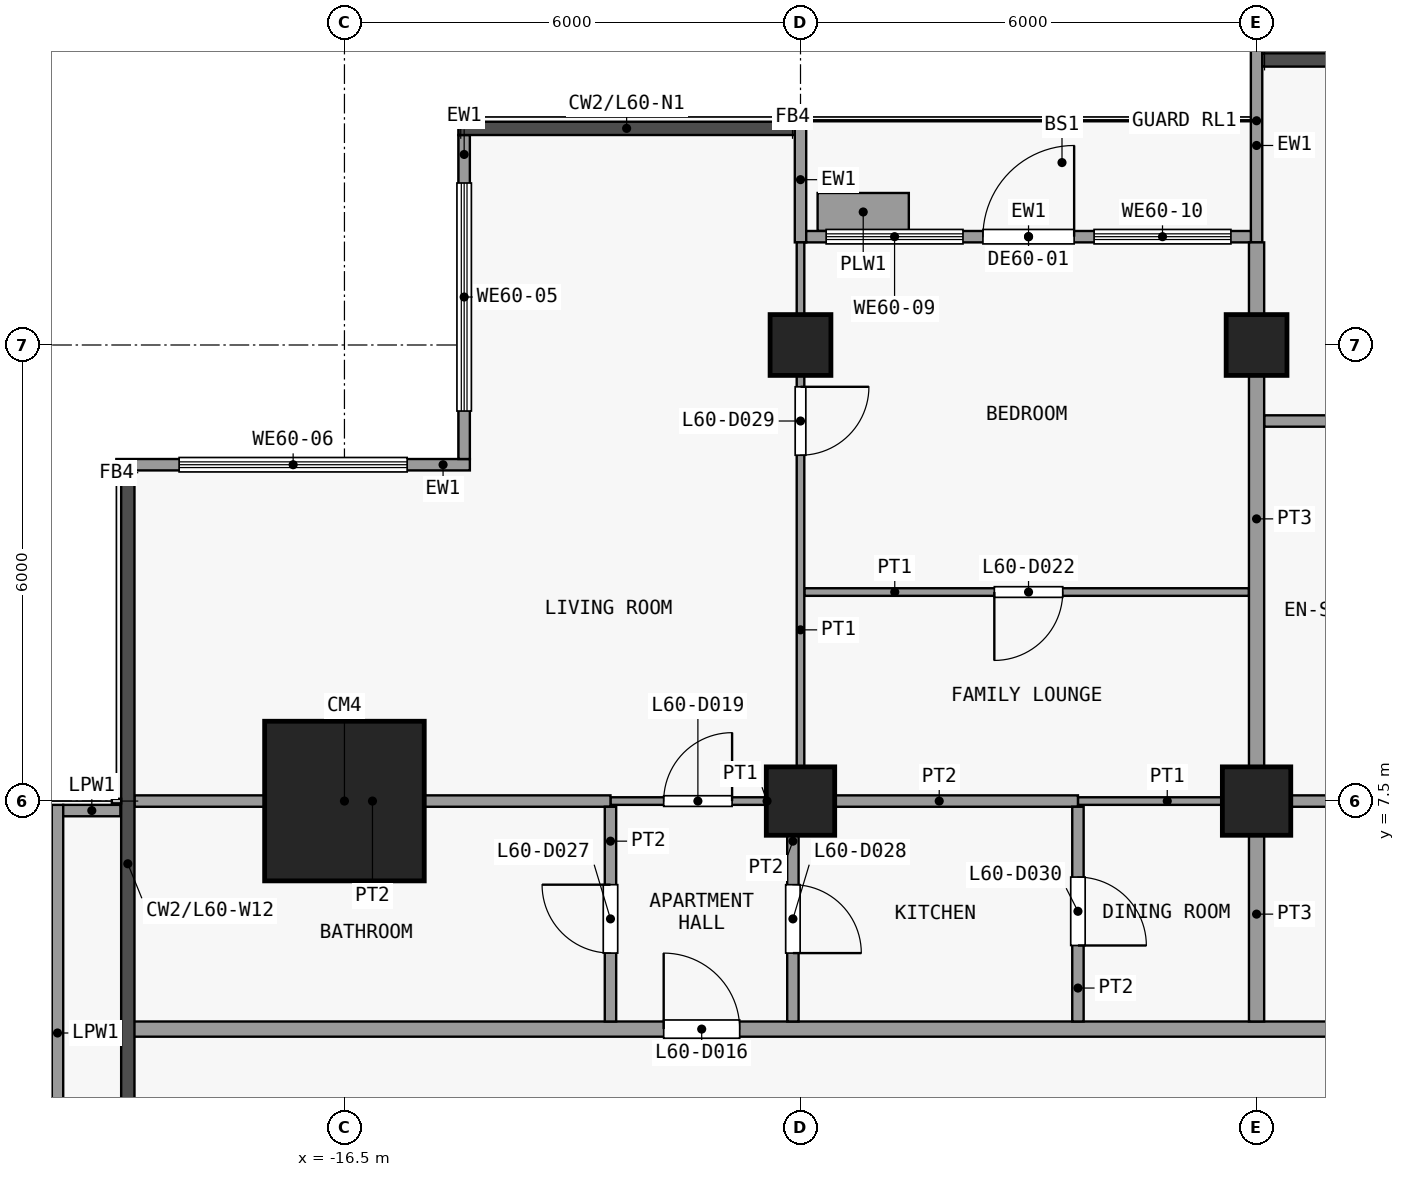
"""IFC4 building model, lengths in metres.
Left out: names, types, materials, properties, quantities, classifications, styles, units other than length and angle.
Written with IfcOpenShell. Run it as: python <this file> out.ifc"""

import sys

from ifc_helpers import new_model, si_unit, direction, frame, frame_2d, origin, origin_2d, place, context, subcontext, project, spatial, rectangle, extrude, element, fill, save


model = new_model("IFC4")
c1 = context("Model", 3, precision=1e-05, world=origin(), true_north=direction((0.0, 1.0)))
c2 = subcontext(c1, "Body", "Model", "MODEL_VIEW")
j1 = project(units=[si_unit("LENGTHUNIT", "METRE"), si_unit("PLANEANGLEUNIT", "RADIAN")], contexts=[c1])
p1 = place(None, origin())
s1 = spatial("IfcSite", under=j1, at=p1, CompositionType="ELEMENT")
p2 = place(p1, origin())
s2 = spatial("IfcBuilding", under=s1, at=p2, CompositionType="ELEMENT")
p3 = place(p2, frame((0.0, 0.0, 237.5)))
s3 = spatial("IfcBuildingStorey", under=s2, at=p3, CompositionType="ELEMENT", Elevation=237.5)
p4 = place(p3, frame((-16.5, 7.5, 0.0), z_axis=(0.0, 0.0, 1.0), x_axis=(1.0, 0.0, 0.0)))
e1 = element("IfcColumn", 1, at=p4, inside=s3, PredefinedType="COLUMN", context=c2, shape_type="SweptSolid", body=[
    extrude(rectangle(XDim=2.1, YDim=2.1, at=origin_2d()), origin(), (0.0, 0.0, 1.0), 3.6),
])
p5 = place(p3, frame((-10.5, 7.5, 0.0), z_axis=(0.0, 0.0, 1.0), x_axis=(1.0, 0.0, 0.0)))
e2 = element("IfcColumn", 2, at=p5, inside=s3, PredefinedType="COLUMN", context=c2, shape_type="SweptSolid", body=[
    extrude(rectangle(XDim=0.9, YDim=0.9, at=origin_2d()), origin(), (0.0, 0.0, 1.0), 3.6),
])
p6 = place(p3, frame((-10.5, 13.5, 0.0), z_axis=(0.0, 0.0, 1.0), x_axis=(1.0, 0.0, 0.0)))
e3 = element("IfcColumn", 3, at=p6, inside=s3, PredefinedType="COLUMN", context=c2, shape_type="SweptSolid", body=[
    extrude(rectangle(XDim=0.8, YDim=0.8, at=origin_2d()), origin(), (0.0, 0.0, 1.0), 3.6),
])
p7 = place(p3, frame((-4.5, 7.5, 0.0), z_axis=(0.0, 0.0, 1.0), x_axis=(1.0, 0.0, 0.0)))
e4 = element("IfcColumn", 4, at=p7, inside=s3, PredefinedType="COLUMN", context=c2, shape_type="SweptSolid", body=[
    extrude(rectangle(XDim=0.9, YDim=0.9, at=origin_2d()), origin(), (0.0, 0.0, 1.0), 3.6),
])
p8 = place(p3, frame((-4.5, 13.5, 0.0), z_axis=(0.0, 0.0, 1.0), x_axis=(1.0, 0.0, 0.0)))
e5 = element("IfcColumn", 5, at=p8, inside=s3, PredefinedType="COLUMN", context=c2, shape_type="SweptSolid", body=[
    extrude(rectangle(XDim=0.8, YDim=0.8, at=origin_2d()), origin(), (0.0, 0.0, 1.0), 3.6),
])
p9 = place(p3, frame((-14.925, 12.0, 0.0), z_axis=(0.0, 0.0, 1.0), x_axis=(0.0, 1.0, 0.0)))
e6 = element("IfcWall", 6, at=p9, inside=s3, PredefinedType="SOLIDWALL", context=c2, shape_type="SweptSolid", body=[
    extrude(rectangle(XDim=4.262, YDim=0.15, at=frame_2d((2.131, 0.0))), origin(), (0.0, 0.0, 1.0), 3.3),
])
p10 = place(p9, frame((0.631, 0.0, 0.9)))
e7 = element("IfcOpeningElement", 7, at=p10, cuts=e6, PredefinedType="OPENING", context=c2, shape_type="SweptSolid", body=[
    extrude(rectangle(XDim=3.0, YDim=2.4, at=frame_2d((1.5, 1.2))), frame((0.0, 0.085, 0.0), z_axis=(0.0, -1.0, 0.0), x_axis=(1.0, 0.0, 0.0)), (0.0, 0.0, 1.0), 0.17),
])
p11 = place(p3, frame((-19.5, 11.925, 0.0), z_axis=(0.0, 0.0, 1.0), x_axis=(1.0, 0.0, 0.0)))
e8 = element("IfcWall", 8, at=p11, inside=s3, PredefinedType="SOLIDWALL", context=c2, shape_type="SweptSolid", body=[
    extrude(rectangle(XDim=4.65, YDim=0.15, at=frame_2d((2.325, 0.0))), origin(), (0.0, 0.0, 1.0), 3.3),
])
p12 = place(p11, frame((0.825, 0.0, 0.9)))
e9 = element("IfcOpeningElement", 9, at=p12, cuts=e8, PredefinedType="OPENING", context=c2, shape_type="SweptSolid", body=[
    extrude(rectangle(XDim=3.0, YDim=2.4, at=frame_2d((1.5, 1.2))), frame((0.0, 0.085, 0.0), z_axis=(0.0, -1.0, 0.0), x_axis=(1.0, 0.0, 0.0)), (0.0, 0.0, 1.0), 0.17),
])
p13 = place(p3, frame((-10.5, 14.85, 0.0), z_axis=(0.0, 0.0, 1.0), x_axis=(0.0, 1.0, 0.0)))
e10 = element("IfcWall", 10, at=p13, inside=s3, PredefinedType="SOLIDWALL", context=c2, shape_type="SweptSolid", body=[
    extrude(rectangle(XDim=1.65, YDim=0.15, at=frame_2d((0.825, 0.0))), origin(), (0.0, 0.0, 1.0), 3.3),
])
p14 = place(p3, frame((-4.5, 14.85, 0.0), z_axis=(0.0, 0.0, 1.0), x_axis=(0.0, 1.0, 0.0)))
e11 = element("IfcWall", 11, at=p14, inside=s3, PredefinedType="SOLIDWALL", context=c2, shape_type="SweptSolid", body=[
    extrude(rectangle(XDim=2.55, YDim=0.15, at=frame_2d((1.275, 0.0))), origin(), (0.0, 0.0, 1.0), 3.3),
])
p15 = place(p3, frame((-10.425, 14.925, 0.0), z_axis=(0.0, 0.0, 1.0), x_axis=(1.0, 0.0, 0.0)))
e12 = element("IfcWall", 12, at=p15, inside=s3, PredefinedType="SOLIDWALL", context=c2, shape_type="SweptSolid", body=[
    extrude(rectangle(XDim=5.85, YDim=0.15, at=frame_2d((2.925, 0.0))), origin(), (0.0, 0.0, 1.0), 3.3),
])
p16 = place(p15, frame((2.325, 0.0, 0.0)))
e13 = element("IfcOpeningElement", 13, at=p16, cuts=e12, PredefinedType="OPENING", context=c2, shape_type="SweptSolid", body=[
    extrude(rectangle(XDim=1.2, YDim=2.4, at=frame_2d((0.6, 1.2))), frame((0.0, 0.085, 0.0), z_axis=(0.0, -1.0, 0.0), x_axis=(1.0, 0.0, 0.0)), (0.0, 0.0, 1.0), 0.17),
])
p17 = place(p15, frame((0.262, 0.0, 0.9)))
e14 = element("IfcOpeningElement", 14, at=p17, cuts=e12, PredefinedType="OPENING", context=c2, shape_type="SweptSolid", body=[
    extrude(rectangle(XDim=1.8, YDim=2.1, at=frame_2d((0.9, 1.05))), frame((0.0, 0.085, 0.0), z_axis=(0.0, -1.0, 0.0), x_axis=(1.0, 0.0, 0.0)), (0.0, 0.0, 1.0), 0.17),
])
p18 = place(p15, frame((3.788, 0.0, 0.9)))
e15 = element("IfcOpeningElement", 15, at=p18, cuts=e12, PredefinedType="OPENING", context=c2, shape_type="SweptSolid", body=[
    extrude(rectangle(XDim=1.8, YDim=2.1, at=frame_2d((0.9, 1.05))), frame((0.0, 0.085, 0.0), z_axis=(0.0, -1.0, 0.0), x_axis=(1.0, 0.0, 0.0)), (0.0, 0.0, 1.0), 0.17),
])
p19 = place(p3, frame((-10.275, 15.25, 0.0), z_axis=(0.0, 0.0, 1.0), x_axis=(1.0, 0.0, 0.0)))
e16 = element("IfcWall", 16, at=p19, inside=s3, PredefinedType="USERDEFINED", context=c2, shape_type="SweptSolid", body=[
    extrude(rectangle(XDim=1.2, YDim=0.5, at=frame_2d((0.6, 0.0))), origin(), (0.0, 0.0, 1.0), 0.9),
])
p20 = place(p3, frame((-20.275, 1.448, 0.0), z_axis=(0.0, 0.0, 1.0), x_axis=(0.0, 1.0, 0.0)))
e17 = element("IfcWall", 17, at=p20, inside=s3, PredefinedType="PARAPET", context=c2, shape_type="SweptSolid", body=[
    extrude(rectangle(XDim=6.002, YDim=0.15, at=frame_2d((3.001, 0.0))), origin(), (0.0, 0.0, 1.0), 1.15),
])
p21 = place(p3, frame((-20.2, 7.375, 0.0), z_axis=(0.0, 0.0, 1.0), x_axis=(1.0, 0.0, 0.0)))
e18 = element("IfcWall", 18, at=p21, inside=s3, PredefinedType="PARAPET", context=c2, shape_type="SweptSolid", body=[
    extrude(rectangle(XDim=0.752, YDim=0.15, at=frame_2d((0.376, 0.0))), origin(), (0.0, 0.0, 1.0), 1.15),
])
p22 = place(p3, frame((-19.35, 4.5, 0.0), z_axis=(0.0, 0.0, 1.0), x_axis=(1.0, 0.0, 0.0)))
e19 = element("IfcWall", 19, at=p22, inside=s3, PredefinedType="PARTITIONING", context=c2, shape_type="SweptSolid", body=[
    extrude(rectangle(XDim=37.2, YDim=0.2, at=frame_2d((18.6, 0.0))), origin(), (0.0, 0.0, 1.0), 3.3),
])
p23 = place(p22, frame((7.05, 0.0, 0.0)))
e20 = element("IfcOpeningElement", 20, at=p23, cuts=e19, PredefinedType="OPENING", context=c2, shape_type="SweptSolid", body=[
    extrude(rectangle(XDim=1.0, YDim=2.1, at=frame_2d((0.5, 1.05))), frame((0.0, 0.11, 0.0), z_axis=(0.0, -1.0, 0.0), x_axis=(1.0, 0.0, 0.0)), (0.0, 0.0, 1.0), 0.22),
])
p24 = place(p22, frame((24.55, 0.0, 0.0)))
e21 = element("IfcOpeningElement", 21, at=p24, cuts=e19, PredefinedType="OPENING", context=c2, shape_type="SweptSolid", body=[
    extrude(rectangle(XDim=1.0, YDim=2.1, at=frame_2d((0.5, 1.05))), frame((0.0, 0.11, 0.0), z_axis=(0.0, -1.0, 0.0), x_axis=(1.0, 0.0, 0.0)), (0.0, 0.0, 1.0), 0.22),
])
p25 = place(p22, frame((33.05, 0.0, 0.0)))
e22 = element("IfcOpeningElement", 22, at=p25, cuts=e19, PredefinedType="OPENING", context=c2, shape_type="SweptSolid", body=[
    extrude(rectangle(XDim=1.0, YDim=2.1, at=frame_2d((0.5, 1.05))), frame((0.0, 0.11, 0.0), z_axis=(0.0, -1.0, 0.0), x_axis=(1.0, 0.0, 0.0)), (0.0, 0.0, 1.0), 0.22),
])
p26 = place(p3, frame((-13.0, 7.5, 0.0), z_axis=(0.0, 0.0, 1.0), x_axis=(1.0, 0.0, 0.0)))
e23 = element("IfcWall", 23, at=p26, inside=s3, PredefinedType="PARTITIONING", context=c2, shape_type="SweptSolid", body=[
    extrude(rectangle(XDim=2.4, YDim=0.1, at=frame_2d((1.2, 0.0))), origin(), (0.0, 0.0, 1.0), 3.3),
])
p27 = place(p26, frame((0.7, 0.0, 0.0)))
e24 = element("IfcOpeningElement", 24, at=p27, cuts=e23, PredefinedType="OPENING", context=c2, shape_type="SweptSolid", body=[
    extrude(rectangle(XDim=0.9, YDim=2.1, at=frame_2d((0.45, 1.05))), frame((0.0, 0.06, 0.0), z_axis=(0.0, -1.0, 0.0), x_axis=(1.0, 0.0, 0.0)), (0.0, 0.0, 1.0), 0.12),
])
p28 = place(p3, frame((-6.85, 7.5, 0.0), z_axis=(0.0, 0.0, 1.0), x_axis=(1.0, 0.0, 0.0)))
e25 = element("IfcWall", 25, at=p28, inside=s3, PredefinedType="PARTITIONING", context=c2, shape_type="SweptSolid", body=[
    extrude(rectangle(XDim=2.35, YDim=0.1, at=frame_2d((1.175, 0.0))), origin(), (0.0, 0.0, 1.0), 3.3),
])
p29 = place(p3, frame((-19.262, 7.5, 0.0), z_axis=(0.0, 0.0, 1.0), x_axis=(1.0, 0.0, 0.0)))
e26 = element("IfcWall", 26, at=p29, inside=s3, PredefinedType="PARTITIONING", context=c2, shape_type="SweptSolid", body=[
    extrude(rectangle(XDim=6.262, YDim=0.15, at=frame_2d((3.131, 0.0))), origin(), (0.0, 0.0, 1.0), 3.3),
])
p30 = place(p3, frame((-10.5, 7.5, 0.0), z_axis=(0.0, 0.0, 1.0), x_axis=(1.0, 0.0, 0.0)))
e27 = element("IfcWall", 27, at=p30, inside=s3, PredefinedType="PARTITIONING", context=c2, shape_type="SweptSolid", body=[
    extrude(rectangle(XDim=3.65, YDim=0.15, at=frame_2d((1.825, 0.0))), origin(), (0.0, 0.0, 1.0), 3.3),
])
p31 = place(p3, frame((-4.5, 7.5, 0.0), z_axis=(0.0, 0.0, 1.0), x_axis=(1.0, 0.0, 0.0)))
e28 = element("IfcWall", 28, at=p31, inside=s3, PredefinedType="PARTITIONING", context=c2, shape_type="SweptSolid", body=[
    extrude(rectangle(XDim=9.0, YDim=0.15, at=frame_2d((4.5, 0.0))), origin(), (0.0, 0.0, 1.0), 3.3),
])
p32 = place(p3, frame((-10.45, 10.25, 0.0), z_axis=(0.0, 0.0, 1.0), x_axis=(1.0, 0.0, 0.0)))
e29 = element("IfcWall", 29, at=p32, inside=s3, PredefinedType="PARTITIONING", context=c2, shape_type="SweptSolid", body=[
    extrude(rectangle(XDim=5.85, YDim=0.1, at=frame_2d((2.925, 0.0))), origin(), (0.0, 0.0, 1.0), 3.3),
])
p33 = place(p32, frame((2.5, 0.0, 0.0)))
e30 = element("IfcOpeningElement", 30, at=p33, cuts=e29, PredefinedType="OPENING", context=c2, shape_type="SweptSolid", body=[
    extrude(rectangle(XDim=0.9, YDim=2.1, at=frame_2d((0.45, 1.05))), frame((0.0, 0.06, 0.0), z_axis=(0.0, -1.0, 0.0), x_axis=(1.0, 0.0, 0.0)), (0.0, 0.0, 1.0), 0.12),
])
p34 = place(p3, frame((-4.4, 12.5, 0.0), z_axis=(0.0, 0.0, 1.0), x_axis=(1.0, 0.0, 0.0)))
e31 = element("IfcWall", 31, at=p34, inside=s3, PredefinedType="PARTITIONING", context=c2, shape_type="SweptSolid", body=[
    extrude(rectangle(XDim=3.2, YDim=0.15, at=frame_2d((1.6, 0.0))), origin(), (0.0, 0.0, 1.0), 3.3),
])
p35 = place(p34, frame((1.1, 0.0, 0.0)))
e32 = element("IfcOpeningElement", 32, at=p35, cuts=e31, PredefinedType="OPENING", context=c2, shape_type="SweptSolid", body=[
    extrude(rectangle(XDim=0.9, YDim=2.1, at=frame_2d((0.45, 1.05))), frame((0.0, 0.085, 0.0), z_axis=(0.0, -1.0, 0.0), x_axis=(1.0, 0.0, 0.0)), (0.0, 0.0, 1.0), 0.17),
])
p36 = place(p3, frame((-13.0, 4.6, 0.0), z_axis=(0.0, 0.0, 1.0), x_axis=(0.0, 1.0, 0.0)))
e33 = element("IfcWall", 33, at=p36, inside=s3, PredefinedType="PARTITIONING", context=c2, shape_type="SweptSolid", body=[
    extrude(rectangle(XDim=2.825, YDim=0.15, at=frame_2d((1.413, 0.0))), origin(), (0.0, 0.0, 1.0), 3.3),
])
p37 = place(p36, frame((0.9, 0.0, 0.0)))
e34 = element("IfcOpeningElement", 34, at=p37, cuts=e33, PredefinedType="OPENING", context=c2, shape_type="SweptSolid", body=[
    extrude(rectangle(XDim=0.9, YDim=2.1, at=frame_2d((0.45, 1.05))), frame((0.0, 0.085, 0.0), z_axis=(0.0, -1.0, 0.0), x_axis=(1.0, 0.0, 0.0)), (0.0, 0.0, 1.0), 0.17),
])
p38 = place(p3, frame((-10.6, 4.6, 0.0), z_axis=(0.0, 0.0, 1.0), x_axis=(0.0, 1.0, 0.0)))
e35 = element("IfcWall", 35, at=p38, inside=s3, PredefinedType="PARTITIONING", context=c2, shape_type="SweptSolid", body=[
    extrude(rectangle(XDim=2.825, YDim=0.15, at=frame_2d((1.413, 0.0))), origin(), (0.0, 0.0, 1.0), 3.3),
])
p39 = place(p38, frame((0.9, 0.0, 0.0)))
e36 = element("IfcOpeningElement", 36, at=p39, cuts=e35, PredefinedType="OPENING", context=c2, shape_type="SweptSolid", body=[
    extrude(rectangle(XDim=0.9, YDim=2.1, at=frame_2d((0.45, 1.05))), frame((0.0, 0.085, 0.0), z_axis=(0.0, -1.0, 0.0), x_axis=(1.0, 0.0, 0.0)), (0.0, 0.0, 1.0), 0.17),
])
p40 = place(p3, frame((-10.5, 7.575, 0.0), z_axis=(0.0, 0.0, 1.0), x_axis=(0.0, 1.0, 0.0)))
e37 = element("IfcWall", 37, at=p40, inside=s3, PredefinedType="PARTITIONING", context=c2, shape_type="SweptSolid", body=[
    extrude(rectangle(XDim=7.275, YDim=0.1, at=frame_2d((3.638, 0.0))), origin(), (0.0, 0.0, 1.0), 3.3),
])
p41 = place(p40, frame((4.475, 0.0, 0.0)))
e38 = element("IfcOpeningElement", 38, at=p41, cuts=e37, PredefinedType="OPENING", context=c2, shape_type="SweptSolid", body=[
    extrude(rectangle(XDim=0.9, YDim=2.1, at=frame_2d((0.45, 1.05))), frame((0.0, 0.06, 0.0), z_axis=(0.0, -1.0, 0.0), x_axis=(1.0, 0.0, 0.0)), (0.0, 0.0, 1.0), 0.12),
])
p42 = place(p3, frame((-6.85, 4.6, 0.0), z_axis=(0.0, 0.0, 1.0), x_axis=(0.0, 1.0, 0.0)))
e39 = element("IfcWall", 39, at=p42, inside=s3, PredefinedType="PARTITIONING", context=c2, shape_type="SweptSolid", body=[
    extrude(rectangle(XDim=2.825, YDim=0.15, at=frame_2d((1.413, 0.0))), origin(), (0.0, 0.0, 1.0), 3.3),
])
p43 = place(p42, frame((1.0, 0.0, 0.0)))
e40 = element("IfcOpeningElement", 40, at=p43, cuts=e39, PredefinedType="OPENING", context=c2, shape_type="SweptSolid", body=[
    extrude(rectangle(XDim=0.9, YDim=2.1, at=frame_2d((0.45, 1.05))), frame((0.0, 0.085, 0.0), z_axis=(0.0, -1.0, 0.0), x_axis=(1.0, 0.0, 0.0)), (0.0, 0.0, 1.0), 0.17),
])
p44 = place(p3, frame((-4.5, 4.6, 0.0), z_axis=(0.0, 0.0, 1.0), x_axis=(0.0, 1.0, 0.0)))
e41 = element("IfcWall", 41, at=p44, inside=s3, PredefinedType="PARTITIONING", context=c2, shape_type="SweptSolid", body=[
    extrude(rectangle(XDim=2.825, YDim=0.2, at=frame_2d((1.413, 0.0))), origin(), (0.0, 0.0, 1.0), 3.3),
])
p45 = place(p3, frame((-4.5, 7.575, 0.0), z_axis=(0.0, 0.0, 1.0), x_axis=(0.0, 1.0, 0.0)))
e42 = element("IfcWall", 42, at=p45, inside=s3, PredefinedType="PARTITIONING", context=c2, shape_type="SweptSolid", body=[
    extrude(rectangle(XDim=7.275, YDim=0.2, at=frame_2d((3.638, 0.0))), origin(), (0.0, 0.0, 1.0), 3.3),
])
p46 = place(p10, origin())
e43 = element("IfcWindow", 43, at=p46, inside=s3, PartitioningType="SINGLE_PANEL", PredefinedType="WINDOW", context=c2, shape_type="SweptSolid", body=[
    extrude(rectangle(XDim=3.0, YDim=2.4, at=frame_2d((1.5, 1.2))), frame((0.0, 0.03, 0.0), z_axis=(0.0, -1.0, 0.0), x_axis=(1.0, 0.0, 0.0)), (0.0, 0.0, 1.0), 0.06),
])
fill(e7, e43)
p47 = place(p12, origin())
e44 = element("IfcWindow", 44, at=p47, inside=s3, PartitioningType="SINGLE_PANEL", PredefinedType="WINDOW", context=c2, shape_type="SweptSolid", body=[
    extrude(rectangle(XDim=3.0, YDim=2.4, at=frame_2d((1.5, 1.2))), frame((0.0, 0.03, 0.0), z_axis=(0.0, -1.0, 0.0), x_axis=(1.0, 0.0, 0.0)), (0.0, 0.0, 1.0), 0.06),
])
fill(e9, e44)
p48 = place(p16, origin())
e45 = element("IfcDoor", 45, at=p48, inside=s3, OperationType="SINGLE_SWING_RIGHT", PredefinedType="DOOR", context=c2, shape_type="SweptSolid", body=[
    extrude(rectangle(XDim=1.2, YDim=2.4, at=frame_2d((0.6, 1.2))), frame((0.0, 0.025, 0.0), z_axis=(0.0, -1.0, 0.0), x_axis=(1.0, 0.0, 0.0)), (0.0, 0.0, 1.0), 0.05),
])
fill(e13, e45)
p49 = place(p17, origin())
e46 = element("IfcWindow", 46, at=p49, inside=s3, PartitioningType="SINGLE_PANEL", PredefinedType="WINDOW", context=c2, shape_type="SweptSolid", body=[
    extrude(rectangle(XDim=1.8, YDim=2.1, at=frame_2d((0.9, 1.05))), frame((0.0, 0.03, 0.0), z_axis=(0.0, -1.0, 0.0), x_axis=(1.0, 0.0, 0.0)), (0.0, 0.0, 1.0), 0.06),
])
fill(e14, e46)
p50 = place(p18, origin())
e47 = element("IfcWindow", 47, at=p50, inside=s3, PartitioningType="SINGLE_PANEL", PredefinedType="WINDOW", context=c2, shape_type="SweptSolid", body=[
    extrude(rectangle(XDim=1.8, YDim=2.1, at=frame_2d((0.9, 1.05))), frame((0.0, 0.03, 0.0), z_axis=(0.0, -1.0, 0.0), x_axis=(1.0, 0.0, 0.0)), (0.0, 0.0, 1.0), 0.06),
])
fill(e15, e47)
p51 = place(p23, origin())
e48 = element("IfcDoor", 48, at=p51, inside=s3, OperationType="SINGLE_SWING_RIGHT", PredefinedType="DOOR", context=c2, shape_type="SweptSolid", body=[
    extrude(rectangle(XDim=1.0, YDim=2.1, at=frame_2d((0.5, 1.05))), frame((0.0, 0.025, 0.0), z_axis=(0.0, -1.0, 0.0), x_axis=(1.0, 0.0, 0.0)), (0.0, 0.0, 1.0), 0.05),
])
fill(e20, e48)
p52 = place(p27, origin())
e49 = element("IfcDoor", 49, at=p52, inside=s3, OperationType="SINGLE_SWING_LEFT", PredefinedType="DOOR", context=c2, shape_type="SweptSolid", body=[
    extrude(rectangle(XDim=0.9, YDim=2.1, at=frame_2d((0.45, 1.05))), frame((0.0, 0.025, 0.0), z_axis=(0.0, -1.0, 0.0), x_axis=(1.0, 0.0, 0.0)), (0.0, 0.0, 1.0), 0.05),
])
fill(e24, e49)
p53 = place(p33, origin())
e50 = element("IfcDoor", 50, at=p53, inside=s3, OperationType="SINGLE_SWING_LEFT", PredefinedType="DOOR", context=c2, shape_type="SweptSolid", body=[
    extrude(rectangle(XDim=0.9, YDim=2.1, at=frame_2d((0.45, 1.05))), frame((0.0, 0.025, 0.0), z_axis=(0.0, -1.0, 0.0), x_axis=(1.0, 0.0, 0.0)), (0.0, 0.0, 1.0), 0.05),
])
fill(e30, e50)
p54 = place(p37, origin())
e51 = element("IfcDoor", 51, at=p54, inside=s3, OperationType="SINGLE_SWING_LEFT", PredefinedType="DOOR", context=c2, shape_type="SweptSolid", body=[
    extrude(rectangle(XDim=0.9, YDim=2.1, at=frame_2d((0.45, 1.05))), frame((0.0, 0.025, 0.0), z_axis=(0.0, -1.0, 0.0), x_axis=(1.0, 0.0, 0.0)), (0.0, 0.0, 1.0), 0.05),
])
fill(e34, e51)
p55 = place(p39, origin())
e52 = element("IfcDoor", 52, at=p55, inside=s3, OperationType="SINGLE_SWING_LEFT", PredefinedType="DOOR", context=c2, shape_type="SweptSolid", body=[
    extrude(rectangle(XDim=0.9, YDim=2.1, at=frame_2d((0.45, 1.05))), frame((0.0, 0.025, 0.0), z_axis=(0.0, -1.0, 0.0), x_axis=(1.0, 0.0, 0.0)), (0.0, 0.0, 1.0), 0.05),
])
fill(e36, e52)
p56 = place(p41, origin())
e53 = element("IfcDoor", 53, at=p56, inside=s3, OperationType="SINGLE_SWING_RIGHT", PredefinedType="DOOR", context=c2, shape_type="SweptSolid", body=[
    extrude(rectangle(XDim=0.9, YDim=2.1, at=frame_2d((0.45, 1.05))), frame((0.0, 0.025, 0.0), z_axis=(0.0, -1.0, 0.0), x_axis=(1.0, 0.0, 0.0)), (0.0, 0.0, 1.0), 0.05),
])
fill(e38, e53)
p57 = place(p43, origin())
e54 = element("IfcDoor", 54, at=p57, inside=s3, OperationType="SINGLE_SWING_LEFT", PredefinedType="DOOR", context=c2, shape_type="SweptSolid", body=[
    extrude(rectangle(XDim=0.9, YDim=2.1, at=frame_2d((0.45, 1.05))), frame((0.0, 0.025, 0.0), z_axis=(0.0, -1.0, 0.0), x_axis=(1.0, 0.0, 0.0)), (0.0, 0.0, 1.0), 0.05),
])
fill(e40, e54)
save(model, sys.argv[1])
